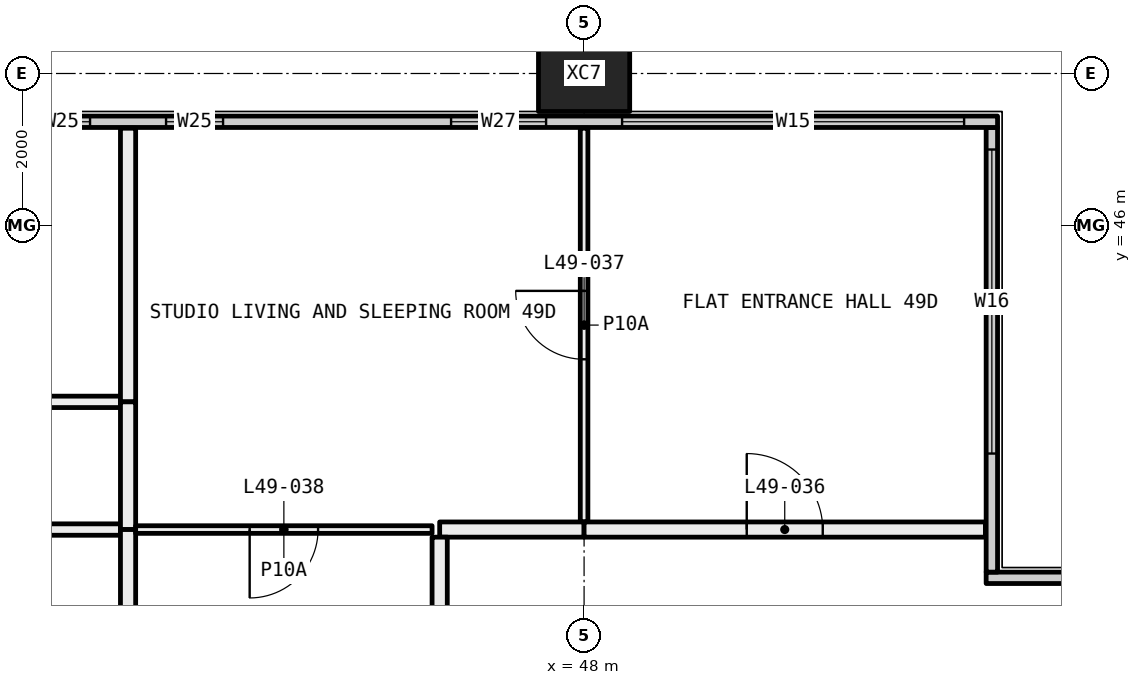
"""IFC4 building model, lengths in metres.
Left out: names, types, materials, properties, quantities, classifications, styles, units other than length and angle.
Written with IfcOpenShell. Run it as: python <this file> out.ifc"""

import sys

from ifc_helpers import new_model, si_unit, direction, frame, frame_2d, origin, origin_2d, place, context, subcontext, project, spatial, rectangle, hollow_rectangle, extrude, element, fill, save


model = new_model("IFC4")
c1 = context("Model", 3, precision=1e-05, world=origin(), true_north=direction((0.0, 1.0)))
c2 = subcontext(c1, "Body", "Model", "MODEL_VIEW")
j1 = project(units=[si_unit("LENGTHUNIT", "METRE"), si_unit("PLANEANGLEUNIT", "RADIAN")], contexts=[c1])
p1 = place(None, origin())
s1 = spatial("IfcSite", under=j1, at=p1, CompositionType="ELEMENT")
p2 = place(p1, origin())
s2 = spatial("IfcBuilding", under=s1, at=p2, CompositionType="ELEMENT")
p3 = place(p2, frame((0.0, 0.0, 185.85)))
s3 = spatial("IfcBuildingStorey", under=s2, at=p3, CompositionType="ELEMENT", Elevation=185.85)
p4 = place(p3, frame((48.0, 48.0, -0.4), z_axis=(0.0, 0.0, 1.0), x_axis=(1.0, 0.0, 0.0)))
e1 = element("IfcColumn", 1, at=p4, inside=s3, PredefinedType="COLUMN", context=c2, shape_type="SweptSolid", body=[
    extrude(hollow_rectangle(XDim=1.2, YDim=1.0, WallThickness=0.045, at=origin_2d()), origin(), (0.0, 0.0, 1.0), 3.45),
])
p5 = place(p3, frame((53.29, 41.365, 0.0), z_axis=(0.0, 0.0, 1.0), x_axis=(1.0, 0.0, 0.0)))
e2 = element("IfcWall", 2, at=p5, inside=s3, PredefinedType="ELEMENTEDWALL", context=c2, shape_type="SweptSolid", body=[
    extrude(rectangle(XDim=6.15, YDim=0.15, at=frame_2d((3.075, 0.0))), origin(), (0.0, 0.0, 1.0), 3.05),
])
p6 = place(p5, frame((1.71, 0.0, 0.45)))
e3 = element("IfcOpeningElement", 3, at=p6, cuts=e2, PredefinedType="OPENING", context=c2, shape_type="SweptSolid", body=[
    extrude(rectangle(XDim=4.0, YDim=2.55, at=frame_2d((2.0, 1.275))), frame((0.0, 0.085, 0.0), z_axis=(0.0, -1.0, 0.0), x_axis=(1.0, 0.0, 0.0)), (0.0, 0.0, 1.0), 0.17),
])
p7 = place(p3, frame((53.365, 41.44, 0.0), z_axis=(0.0, 0.0, 1.0), x_axis=(0.0, 1.0, 0.0)))
e4 = element("IfcWall", 4, at=p7, inside=s3, PredefinedType="ELEMENTEDWALL", context=c2, shape_type="SweptSolid", body=[
    extrude(rectangle(XDim=5.85, YDim=0.15, at=frame_2d((2.925, 0.0))), origin(), (0.0, 0.0, 1.0), 3.05),
])
p8 = place(p7, frame((1.56, 0.0, 0.45)))
e5 = element("IfcOpeningElement", 5, at=p8, cuts=e4, PredefinedType="OPENING", context=c2, shape_type="SweptSolid", body=[
    extrude(rectangle(XDim=4.0, YDim=2.55, at=frame_2d((2.0, 1.275))), frame((0.0, 0.085, 0.0), z_axis=(0.0, -1.0, 0.0), x_axis=(1.0, 0.0, 0.0)), (0.0, 0.0, 1.0), 0.17),
])
p9 = place(p3, frame((6.56, 47.365, 0.0), z_axis=(0.0, 0.0, 1.0), x_axis=(1.0, 0.0, 0.0)))
e6 = element("IfcWall", 6, at=p9, inside=s3, PredefinedType="ELEMENTEDWALL", context=c2, shape_type="SweptSolid", body=[
    extrude(rectangle(XDim=46.88, YDim=0.15, at=frame_2d((23.44, 0.0))), origin(), (0.0, 0.0, 1.0), 3.05),
])
p10 = place(p9, frame((0.44, 0.0, 0.45)))
e7 = element("IfcOpeningElement", 7, at=p10, cuts=e6, PredefinedType="OPENING", context=c2, shape_type="SweptSolid", body=[
    extrude(rectangle(XDim=4.5, YDim=2.55, at=frame_2d((2.25, 1.275))), frame((0.0, 0.085, 0.0), z_axis=(0.0, -1.0, 0.0), x_axis=(1.0, 0.0, 0.0)), (0.0, 0.0, 1.0), 0.17),
])
p11 = place(p9, frame((5.94, 0.0, 0.45)))
e8 = element("IfcOpeningElement", 8, at=p11, cuts=e6, PredefinedType="OPENING", context=c2, shape_type="SweptSolid", body=[
    extrude(rectangle(XDim=1.25, YDim=2.55, at=frame_2d((0.625, 1.275))), frame((0.0, 0.085, 0.0), z_axis=(0.0, -1.0, 0.0), x_axis=(1.0, 0.0, 0.0)), (0.0, 0.0, 1.0), 0.17),
])
p12 = place(p9, frame((10.19, 0.0, 0.45)))
e9 = element("IfcOpeningElement", 9, at=p12, cuts=e6, PredefinedType="OPENING", context=c2, shape_type="SweptSolid", body=[
    extrude(rectangle(XDim=0.75, YDim=2.55, at=frame_2d((0.375, 1.275))), frame((0.0, 0.085, 0.0), z_axis=(0.0, -1.0, 0.0), x_axis=(1.0, 0.0, 0.0)), (0.0, 0.0, 1.0), 0.17),
])
p13 = place(p9, frame((11.94, 0.0, 0.45)))
e10 = element("IfcOpeningElement", 10, at=p13, cuts=e6, PredefinedType="OPENING", context=c2, shape_type="SweptSolid", body=[
    extrude(rectangle(XDim=0.75, YDim=2.55, at=frame_2d((0.375, 1.275))), frame((0.0, 0.085, 0.0), z_axis=(0.0, -1.0, 0.0), x_axis=(1.0, 0.0, 0.0)), (0.0, 0.0, 1.0), 0.17),
])
p14 = place(p9, frame((15.69, 0.0, 0.45)))
e11 = element("IfcOpeningElement", 11, at=p14, cuts=e6, PredefinedType="OPENING", context=c2, shape_type="SweptSolid", body=[
    extrude(rectangle(XDim=1.25, YDim=2.55, at=frame_2d((0.625, 1.275))), frame((0.0, 0.085, 0.0), z_axis=(0.0, -1.0, 0.0), x_axis=(1.0, 0.0, 0.0)), (0.0, 0.0, 1.0), 0.17),
])
p15 = place(p9, frame((17.94, 0.0, 0.45)))
e12 = element("IfcOpeningElement", 12, at=p15, cuts=e6, PredefinedType="OPENING", context=c2, shape_type="SweptSolid", body=[
    extrude(rectangle(XDim=1.25, YDim=2.55, at=frame_2d((0.625, 1.275))), frame((0.0, 0.085, 0.0), z_axis=(0.0, -1.0, 0.0), x_axis=(1.0, 0.0, 0.0)), (0.0, 0.0, 1.0), 0.17),
])
p16 = place(p9, frame((22.19, 0.0, 0.45)))
e13 = element("IfcOpeningElement", 13, at=p16, cuts=e6, PredefinedType="OPENING", context=c2, shape_type="SweptSolid", body=[
    extrude(rectangle(XDim=0.75, YDim=2.55, at=frame_2d((0.375, 1.275))), frame((0.0, 0.085, 0.0), z_axis=(0.0, -1.0, 0.0), x_axis=(1.0, 0.0, 0.0)), (0.0, 0.0, 1.0), 0.17),
])
p17 = place(p9, frame((23.94, 0.0, 0.45)))
e14 = element("IfcOpeningElement", 14, at=p17, cuts=e6, PredefinedType="OPENING", context=c2, shape_type="SweptSolid", body=[
    extrude(rectangle(XDim=0.75, YDim=2.55, at=frame_2d((0.375, 1.275))), frame((0.0, 0.085, 0.0), z_axis=(0.0, -1.0, 0.0), x_axis=(1.0, 0.0, 0.0)), (0.0, 0.0, 1.0), 0.17),
])
p18 = place(p9, frame((27.69, 0.0, 0.45)))
e15 = element("IfcOpeningElement", 15, at=p18, cuts=e6, PredefinedType="OPENING", context=c2, shape_type="SweptSolid", body=[
    extrude(rectangle(XDim=1.25, YDim=2.55, at=frame_2d((0.625, 1.275))), frame((0.0, 0.085, 0.0), z_axis=(0.0, -1.0, 0.0), x_axis=(1.0, 0.0, 0.0)), (0.0, 0.0, 1.0), 0.17),
])
p19 = place(p9, frame((29.94, 0.0, 0.45)))
e16 = element("IfcOpeningElement", 16, at=p19, cuts=e6, PredefinedType="OPENING", context=c2, shape_type="SweptSolid", body=[
    extrude(rectangle(XDim=1.25, YDim=2.55, at=frame_2d((0.625, 1.275))), frame((0.0, 0.085, 0.0), z_axis=(0.0, -1.0, 0.0), x_axis=(1.0, 0.0, 0.0)), (0.0, 0.0, 1.0), 0.17),
])
p20 = place(p9, frame((34.19, 0.0, 0.45)))
e17 = element("IfcOpeningElement", 17, at=p20, cuts=e6, PredefinedType="OPENING", context=c2, shape_type="SweptSolid", body=[
    extrude(rectangle(XDim=0.75, YDim=2.55, at=frame_2d((0.375, 1.275))), frame((0.0, 0.085, 0.0), z_axis=(0.0, -1.0, 0.0), x_axis=(1.0, 0.0, 0.0)), (0.0, 0.0, 1.0), 0.17),
])
p21 = place(p9, frame((35.94, 0.0, 0.45)))
e18 = element("IfcOpeningElement", 18, at=p21, cuts=e6, PredefinedType="OPENING", context=c2, shape_type="SweptSolid", body=[
    extrude(rectangle(XDim=0.75, YDim=2.55, at=frame_2d((0.375, 1.275))), frame((0.0, 0.085, 0.0), z_axis=(0.0, -1.0, 0.0), x_axis=(1.0, 0.0, 0.0)), (0.0, 0.0, 1.0), 0.17),
])
p22 = place(p9, frame((39.69, 0.0, 0.45)))
e19 = element("IfcOpeningElement", 19, at=p22, cuts=e6, PredefinedType="OPENING", context=c2, shape_type="SweptSolid", body=[
    extrude(rectangle(XDim=1.25, YDim=2.55, at=frame_2d((0.625, 1.275))), frame((0.0, 0.085, 0.0), z_axis=(0.0, -1.0, 0.0), x_axis=(1.0, 0.0, 0.0)), (0.0, 0.0, 1.0), 0.17),
])
p23 = place(p9, frame((41.94, 0.0, 0.45)))
e20 = element("IfcOpeningElement", 20, at=p23, cuts=e6, PredefinedType="OPENING", context=c2, shape_type="SweptSolid", body=[
    extrude(rectangle(XDim=4.5, YDim=2.55, at=frame_2d((2.25, 1.275))), frame((0.0, 0.085, 0.0), z_axis=(0.0, -1.0, 0.0), x_axis=(1.0, 0.0, 0.0)), (0.0, 0.0, 1.0), 0.17),
])
p24 = place(p3, frame((36.075, 43.68, 0.0), z_axis=(0.0, 0.0, 1.0), x_axis=(1.0, 0.0, 0.0)))
e21 = element("IfcWall", 21, at=p24, inside=s3, PredefinedType="PARTITIONING", context=c2, shape_type="SweptSolid", body=[
    extrude(rectangle(XDim=5.825, YDim=0.15, at=frame_2d((2.913, 0.0))), origin(), (0.0, 0.0, 1.0), 2.45),
])
p25 = place(p3, frame((42.0, 43.68, 0.0), z_axis=(0.0, 0.0, 1.0), x_axis=(0.0, 1.0, 0.0)))
e22 = element("IfcWall", 22, at=p25, inside=s3, PredefinedType="PARTITIONING", context=c2, shape_type="SweptSolid", body=[
    extrude(rectangle(XDim=3.6, YDim=0.2, at=frame_2d((1.8, 0.0))), origin(), (0.0, 0.0, 1.0), 3.05),
])
p26 = place(p3, frame((36.075, 42.0, 0.0), z_axis=(0.0, 0.0, 1.0), x_axis=(1.0, 0.0, 0.0)))
e23 = element("IfcWall", 23, at=p26, inside=s3, PredefinedType="PARTITIONING", context=c2, shape_type="SweptSolid", body=[
    extrude(rectangle(XDim=5.825, YDim=0.15, at=frame_2d((2.913, 0.0))), origin(), (0.0, 0.0, 1.0), 2.45),
])
p27 = place(p3, frame((42.0, 42.0, 0.0), z_axis=(0.0, 0.0, 1.0), x_axis=(0.0, 1.0, 0.0)))
e24 = element("IfcWall", 24, at=p27, inside=s3, PredefinedType="PARTITIONING", context=c2, shape_type="SweptSolid", body=[
    extrude(rectangle(XDim=1.68, YDim=0.2, at=frame_2d((0.84, 0.0))), origin(), (0.0, 0.0, 1.0), 3.05),
])
p28 = place(p3, frame((42.0, 36.1, 0.0), z_axis=(0.0, 0.0, 1.0), x_axis=(0.0, 1.0, 0.0)))
e25 = element("IfcWall", 25, at=p28, inside=s3, PredefinedType="PARTITIONING", context=c2, shape_type="SweptSolid", body=[
    extrude(rectangle(XDim=5.9, YDim=0.2, at=frame_2d((2.95, 0.0))), origin(), (0.0, 0.0, 1.0), 3.05),
])
p29 = place(p3, frame((48.0, 42.1, 0.0), z_axis=(0.0, 0.0, 1.0), x_axis=(0.0, 1.0, 0.0)))
e26 = element("IfcWall", 26, at=p29, inside=s3, PredefinedType="PARTITIONING", context=c2, shape_type="SweptSolid", body=[
    extrude(rectangle(XDim=5.18, YDim=0.1, at=frame_2d((2.59, 0.0))), origin(), (0.0, 0.0, 1.0), 3.05),
])
p30 = place(p29, frame((2.14, 0.0, 0.0)))
e27 = element("IfcOpeningElement", 27, at=p30, cuts=e26, PredefinedType="OPENING", context=c2, shape_type="SweptSolid", body=[
    extrude(rectangle(XDim=0.9, YDim=2.1, at=frame_2d((0.45, 1.05))), frame((0.0, 0.06, 0.0), z_axis=(0.0, -1.0, 0.0), x_axis=(1.0, 0.0, 0.0)), (0.0, 0.0, 1.0), 0.12),
])
p31 = place(p3, frame((42.1, 42.0, 0.0), z_axis=(0.0, 0.0, 1.0), x_axis=(1.0, 0.0, 0.0)))
e28 = element("IfcWall", 28, at=p31, inside=s3, PredefinedType="PARTITIONING", context=c2, shape_type="SweptSolid", body=[
    extrude(rectangle(XDim=3.9, YDim=0.1, at=frame_2d((1.95, 0.0))), origin(), (0.0, 0.0, 1.0), 3.05),
])
p32 = place(p31, frame((1.5, 0.0, 0.0)))
e29 = element("IfcOpeningElement", 29, at=p32, cuts=e28, PredefinedType="OPENING", context=c2, shape_type="SweptSolid", body=[
    extrude(rectangle(XDim=0.9, YDim=2.1, at=frame_2d((0.45, 1.05))), frame((0.0, 0.06, 0.0), z_axis=(0.0, -1.0, 0.0), x_axis=(1.0, 0.0, 0.0)), (0.0, 0.0, 1.0), 0.12),
])
p33 = place(p3, frame((46.1, 42.0, 0.0), z_axis=(0.0, 0.0, 1.0), x_axis=(1.0, 0.0, 0.0)))
e30 = element("IfcWall", 30, at=p33, inside=s3, PredefinedType="PARTITIONING", context=c2, shape_type="SweptSolid", body=[
    extrude(rectangle(XDim=1.9, YDim=0.2, at=frame_2d((0.95, 0.0))), origin(), (0.0, 0.0, 1.0), 3.05),
])
p34 = place(p3, frame((48.0, 42.0, 0.0), z_axis=(0.0, 0.0, 1.0), x_axis=(1.0, 0.0, 0.0)))
e31 = element("IfcWall", 31, at=p34, inside=s3, PredefinedType="PARTITIONING", context=c2, shape_type="SweptSolid", body=[
    extrude(rectangle(XDim=5.28, YDim=0.2, at=frame_2d((2.64, 0.0))), origin(), (0.0, 0.0, 1.0), 3.05),
])
p35 = place(p34, frame((2.14, 0.0, 0.0)))
e32 = element("IfcOpeningElement", 32, at=p35, cuts=e31, PredefinedType="OPENING", context=c2, shape_type="SweptSolid", body=[
    extrude(rectangle(XDim=1.0, YDim=2.1, at=frame_2d((0.5, 1.05))), frame((0.0, 0.11, 0.0), z_axis=(0.0, -1.0, 0.0), x_axis=(1.0, 0.0, 0.0)), (0.0, 0.0, 1.0), 0.22),
])
p36 = place(p3, frame((46.1, 36.1, 0.0), z_axis=(0.0, 0.0, 1.0), x_axis=(0.0, 1.0, 0.0)))
e33 = element("IfcWall", 33, at=p36, inside=s3, PredefinedType="PARTITIONING", context=c2, shape_type="SweptSolid", body=[
    extrude(rectangle(XDim=5.8, YDim=0.2, at=frame_2d((2.9, 0.0))), origin(), (0.0, 0.0, 1.0), 3.05),
])
p37 = place(p8, origin())
e34 = element("IfcWindow", 34, at=p37, inside=s3, PartitioningType="SINGLE_PANEL", PredefinedType="WINDOW", context=c2, shape_type="SweptSolid", body=[
    extrude(rectangle(XDim=4.0, YDim=2.55, at=frame_2d((2.0, 1.275))), frame((0.0, 0.03, 0.0), z_axis=(0.0, -1.0, 0.0), x_axis=(1.0, 0.0, 0.0)), (0.0, 0.0, 1.0), 0.06),
])
fill(e5, e34)
p38 = place(p20, origin())
e35 = element("IfcWindow", 35, at=p38, inside=s3, PartitioningType="SINGLE_PANEL", PredefinedType="WINDOW", context=c2, shape_type="SweptSolid", body=[
    extrude(rectangle(XDim=0.75, YDim=2.55, at=frame_2d((0.375, 1.275))), frame((0.0, 0.03, 0.0), z_axis=(0.0, -1.0, 0.0), x_axis=(1.0, 0.0, 0.0)), (0.0, 0.0, 1.0), 0.06),
])
fill(e17, e35)
p39 = place(p21, origin())
e36 = element("IfcWindow", 36, at=p39, inside=s3, PartitioningType="SINGLE_PANEL", PredefinedType="WINDOW", context=c2, shape_type="SweptSolid", body=[
    extrude(rectangle(XDim=0.75, YDim=2.55, at=frame_2d((0.375, 1.275))), frame((0.0, 0.03, 0.0), z_axis=(0.0, -1.0, 0.0), x_axis=(1.0, 0.0, 0.0)), (0.0, 0.0, 1.0), 0.06),
])
fill(e18, e36)
p40 = place(p22, origin())
e37 = element("IfcWindow", 37, at=p40, inside=s3, PartitioningType="SINGLE_PANEL", PredefinedType="WINDOW", context=c2, shape_type="SweptSolid", body=[
    extrude(rectangle(XDim=1.25, YDim=2.55, at=frame_2d((0.625, 1.275))), frame((0.0, 0.03, 0.0), z_axis=(0.0, -1.0, 0.0), x_axis=(1.0, 0.0, 0.0)), (0.0, 0.0, 1.0), 0.06),
])
fill(e19, e37)
p41 = place(p23, origin())
e38 = element("IfcWindow", 38, at=p41, inside=s3, PartitioningType="SINGLE_PANEL", PredefinedType="WINDOW", context=c2, shape_type="SweptSolid", body=[
    extrude(rectangle(XDim=4.5, YDim=2.55, at=frame_2d((2.25, 1.275))), frame((0.0, 0.03, 0.0), z_axis=(0.0, -1.0, 0.0), x_axis=(1.0, 0.0, 0.0)), (0.0, 0.0, 1.0), 0.06),
])
fill(e20, e38)
p42 = place(p35, origin())
e39 = element("IfcDoor", 39, at=p42, inside=s3, OperationType="SINGLE_SWING_RIGHT", PredefinedType="DOOR", context=c2, shape_type="SweptSolid", body=[
    extrude(rectangle(XDim=1.0, YDim=2.1, at=frame_2d((0.5, 1.05))), frame((0.0, 0.025, 0.0), z_axis=(0.0, -1.0, 0.0), x_axis=(1.0, 0.0, 0.0)), (0.0, 0.0, 1.0), 0.05),
])
fill(e32, e39)
p43 = place(p30, origin())
e40 = element("IfcDoor", 40, at=p43, inside=s3, OperationType="SINGLE_SWING_LEFT", PredefinedType="DOOR", context=c2, shape_type="SweptSolid", body=[
    extrude(rectangle(XDim=0.9, YDim=2.1, at=frame_2d((0.45, 1.05))), frame((0.0, 0.025, 0.0), z_axis=(0.0, -1.0, 0.0), x_axis=(1.0, 0.0, 0.0)), (0.0, 0.0, 1.0), 0.05),
])
fill(e27, e40)
p44 = place(p32, frame((0.9, 0.0, 0.0), x_axis=(-1.0, 0.0, 0.0)))
e41 = element("IfcDoor", 41, at=p44, inside=s3, OperationType="SINGLE_SWING_LEFT", PredefinedType="DOOR", context=c2, shape_type="SweptSolid", body=[
    extrude(rectangle(XDim=0.9, YDim=2.1, at=frame_2d((0.45, 1.05))), frame((0.0, 0.025, 0.0), z_axis=(0.0, -1.0, 0.0), x_axis=(1.0, 0.0, 0.0)), (0.0, 0.0, 1.0), 0.05),
])
fill(e29, e41)
save(model, sys.argv[1])
